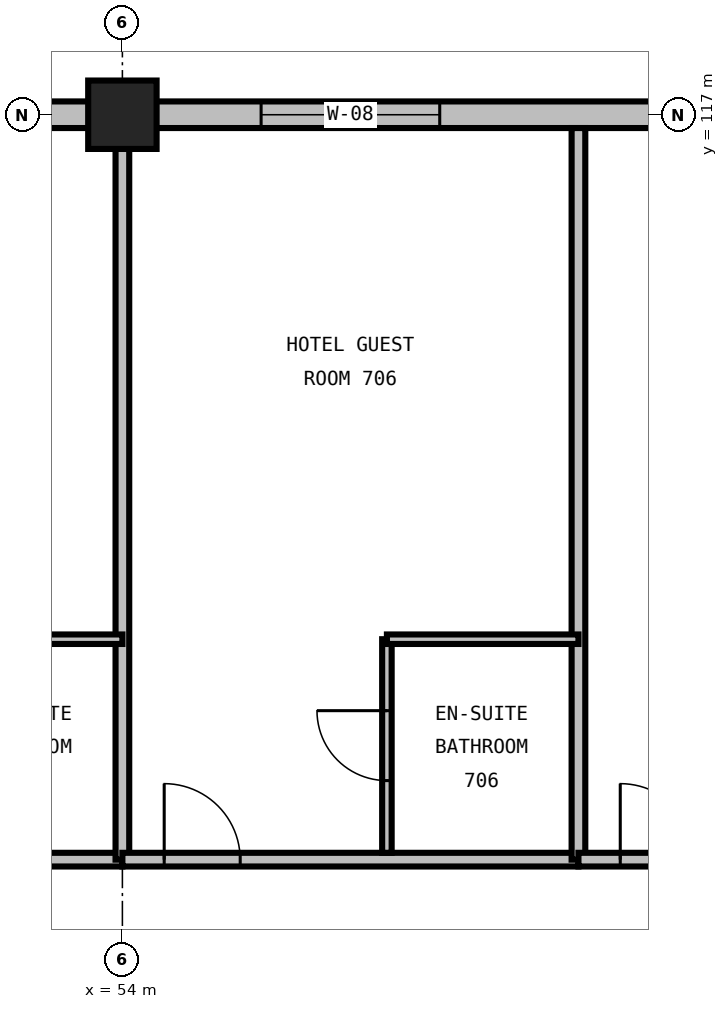
"""IFC4 building model, lengths in metres.
Left out: names, types, materials, properties, quantities, classifications, styles, units other than length and angle.
Written with IfcOpenShell. Run it as: python <this file> out.ifc"""

import sys

from ifc_helpers import new_model, si_unit, direction, frame, frame_2d, origin, origin_2d, place, context, subcontext, project, spatial, rectangle, extrude, element, fill, save


model = new_model("IFC4")
c1 = context("Model", 3, precision=1e-05, world=origin(), true_north=direction((0.0, 1.0)))
c2 = subcontext(c1, "Body", "Model", "MODEL_VIEW")
j1 = project(units=[si_unit("LENGTHUNIT", "METRE"), si_unit("PLANEANGLEUNIT", "RADIAN")], contexts=[c1])
p1 = place(None, origin())
s1 = spatial("IfcSite", under=j1, at=p1, CompositionType="ELEMENT")
p2 = place(p1, origin())
s2 = spatial("IfcBuilding", under=s1, at=p2, CompositionType="ELEMENT")
p3 = place(p2, frame((0.0, 0.0, 34.8)))
s3 = spatial("IfcBuildingStorey", under=s2, at=p3, CompositionType="ELEMENT", Elevation=34.8)
p4 = place(p3, frame((54.0, 117.0, 0.0), z_axis=(0.0, 0.0, 1.0), x_axis=(1.0, 0.0, 0.0)))
e1 = element("IfcColumn", 1, at=p4, inside=s3, PredefinedType="COLUMN", context=c2, shape_type="SweptSolid", body=[
    extrude(rectangle(XDim=0.9, YDim=0.9, at=origin_2d()), origin(), (0.0, 0.0, 1.0), 3.6),
])
p5 = place(p3, frame((54.0, 117.0, 0.0), z_axis=(0.0, 0.0, 1.0), x_axis=(-1.0, 0.0, 0.0)))
e2 = element("IfcWall", 2, at=p5, inside=s3, PredefinedType="STANDARD", context=c2, shape_type="SweptSolid", body=[
    extrude(rectangle(XDim=12.0, YDim=0.35, at=frame_2d((6.0, 0.0))), origin(), (0.0, 0.0, 1.0), 2.486),
])
p6 = place(p5, frame((1.9, 0.0, 0.75)))
e3 = element("IfcOpeningElement", 3, at=p6, cuts=e2, PredefinedType="OPENING", context=c2, shape_type="SweptSolid", body=[
    extrude(rectangle(XDim=2.2, YDim=1.6, at=frame_2d((1.1, 0.8))), frame((0.0, 0.19, 0.0), z_axis=(0.0, -1.0, 0.0), x_axis=(1.0, 0.0, 0.0)), (0.0, 0.0, 1.0), 0.38),
])
p7 = place(p5, frame((7.825, 0.0, 0.75)))
e4 = element("IfcOpeningElement", 4, at=p7, cuts=e2, PredefinedType="OPENING", context=c2, shape_type="SweptSolid", body=[
    extrude(rectangle(XDim=2.35, YDim=1.6, at=frame_2d((1.175, 0.8))), frame((0.0, 0.19, 0.0), z_axis=(0.0, -1.0, 0.0), x_axis=(1.0, 0.0, 0.0)), (0.0, 0.0, 1.0), 0.38),
])
p8 = place(p3, frame((66.0, 117.0, 0.0), z_axis=(0.0, 0.0, 1.0), x_axis=(-1.0, 0.0, 0.0)))
e5 = element("IfcWall", 5, at=p8, inside=s3, PredefinedType="STANDARD", context=c2, shape_type="SweptSolid", body=[
    extrude(rectangle(XDim=12.0, YDim=0.35, at=frame_2d((6.0, 0.0))), origin(), (0.0, 0.0, 1.0), 2.486),
])
p9 = place(p8, frame((1.9, 0.0, 0.75)))
e6 = element("IfcOpeningElement", 6, at=p9, cuts=e5, PredefinedType="OPENING", context=c2, shape_type="SweptSolid", body=[
    extrude(rectangle(XDim=2.2, YDim=1.6, at=frame_2d((1.1, 0.8))), frame((0.0, 0.19, 0.0), z_axis=(0.0, -1.0, 0.0), x_axis=(1.0, 0.0, 0.0)), (0.0, 0.0, 1.0), 0.38),
])
p10 = place(p8, frame((7.825, 0.0, 0.75)))
e7 = element("IfcOpeningElement", 7, at=p10, cuts=e5, PredefinedType="OPENING", context=c2, shape_type="SweptSolid", body=[
    extrude(rectangle(XDim=2.35, YDim=1.6, at=frame_2d((1.175, 0.8))), frame((0.0, 0.19, 0.0), z_axis=(0.0, -1.0, 0.0), x_axis=(1.0, 0.0, 0.0)), (0.0, 0.0, 1.0), 0.38),
])
p11 = place(p3, frame((48.0, 107.2, 0.0), z_axis=(0.0, 0.0, 1.0), x_axis=(1.0, 0.0, 0.0)))
e8 = element("IfcWall", 8, at=p11, inside=s3, PredefinedType="PARTITIONING", context=c2, shape_type="SweptSolid", body=[
    extrude(rectangle(XDim=6.0, YDim=0.18, at=frame_2d((3.0, 0.0))), origin(), (0.0, 0.0, 1.0), 3.29),
])
p12 = place(p11, frame((0.55, 0.0, 0.0)))
e9 = element("IfcOpeningElement", 9, at=p12, cuts=e8, PredefinedType="OPENING", context=c2, shape_type="SweptSolid", body=[
    extrude(rectangle(XDim=1.0, YDim=2.15, at=frame_2d((0.5, 1.075))), frame((0.0, 0.105, 0.0), z_axis=(0.0, -1.0, 0.0), x_axis=(1.0, 0.0, 0.0)), (0.0, 0.0, 1.0), 0.21),
])
p13 = place(p3, frame((54.0, 107.2, 0.0), z_axis=(0.0, 0.0, 1.0), x_axis=(0.0, 1.0, 0.0)))
e10 = element("IfcWall", 10, at=p13, inside=s3, PredefinedType="PARTITIONING", context=c2, shape_type="SweptSolid", body=[
    extrude(rectangle(XDim=9.625, YDim=0.18, at=frame_2d((4.812, 0.0))), origin(), (0.0, 0.0, 1.0), 2.59),
])
p14 = place(p3, frame((51.48, 110.1, 0.0), z_axis=(0.0, 0.0, 1.0), x_axis=(1.0, 0.0, 0.0)))
e11 = element("IfcWall", 11, at=p14, inside=s3, PredefinedType="PARTITIONING", context=c2, shape_type="SweptSolid", body=[
    extrude(rectangle(XDim=2.52, YDim=0.125, at=frame_2d((1.26, 0.0))), origin(), (0.0, 0.0, 1.0), 3.29),
])
p15 = place(p3, frame((54.0, 107.2, 0.0), z_axis=(0.0, 0.0, 1.0), x_axis=(1.0, 0.0, 0.0)))
e12 = element("IfcWall", 12, at=p15, inside=s3, PredefinedType="PARTITIONING", context=c2, shape_type="SweptSolid", body=[
    extrude(rectangle(XDim=6.0, YDim=0.18, at=frame_2d((3.0, 0.0))), origin(), (0.0, 0.0, 1.0), 3.29),
])
p16 = place(p15, frame((0.55, 0.0, 0.0)))
e13 = element("IfcOpeningElement", 13, at=p16, cuts=e12, PredefinedType="OPENING", context=c2, shape_type="SweptSolid", body=[
    extrude(rectangle(XDim=1.0, YDim=2.15, at=frame_2d((0.5, 1.075))), frame((0.0, 0.105, 0.0), z_axis=(0.0, -1.0, 0.0), x_axis=(1.0, 0.0, 0.0)), (0.0, 0.0, 1.0), 0.21),
])
p17 = place(p3, frame((60.0, 107.2, 0.0), z_axis=(0.0, 0.0, 1.0), x_axis=(0.0, 1.0, 0.0)))
e14 = element("IfcWall", 14, at=p17, inside=s3, PredefinedType="PARTITIONING", context=c2, shape_type="SweptSolid", body=[
    extrude(rectangle(XDim=9.625, YDim=0.18, at=frame_2d((4.812, 0.0))), origin(), (0.0, 0.0, 1.0), 3.29),
])
p18 = place(p3, frame((57.48, 107.29, 0.0), z_axis=(0.0, 0.0, 1.0), x_axis=(0.0, 1.0, 0.0)))
e15 = element("IfcWall", 15, at=p18, inside=s3, PredefinedType="PARTITIONING", context=c2, shape_type="SweptSolid", body=[
    extrude(rectangle(XDim=2.81, YDim=0.125, at=frame_2d((1.405, 0.0))), origin(), (0.0, 0.0, 1.0), 3.29),
])
p19 = place(p18, frame((0.95, 0.0, 0.0)))
e16 = element("IfcOpeningElement", 16, at=p19, cuts=e15, PredefinedType="OPENING", context=c2, shape_type="SweptSolid", body=[
    extrude(rectangle(XDim=0.92, YDim=2.1, at=frame_2d((0.46, 1.05))), frame((0.0, 0.077, 0.0), z_axis=(0.0, -1.0, 0.0), x_axis=(1.0, 0.0, 0.0)), (0.0, 0.0, 1.0), 0.155),
])
p20 = place(p3, frame((57.48, 110.1, 0.0), z_axis=(0.0, 0.0, 1.0), x_axis=(1.0, 0.0, 0.0)))
e17 = element("IfcWall", 17, at=p20, inside=s3, PredefinedType="PARTITIONING", context=c2, shape_type="SweptSolid", body=[
    extrude(rectangle(XDim=2.52, YDim=0.125, at=frame_2d((1.26, 0.0))), origin(), (0.0, 0.0, 1.0), 3.29),
])
p21 = place(p3, frame((60.0, 107.2, 0.0), z_axis=(0.0, 0.0, 1.0), x_axis=(1.0, 0.0, 0.0)))
e18 = element("IfcWall", 18, at=p21, inside=s3, PredefinedType="PARTITIONING", context=c2, shape_type="SweptSolid", body=[
    extrude(rectangle(XDim=6.0, YDim=0.18, at=frame_2d((3.0, 0.0))), origin(), (0.0, 0.0, 1.0), 3.29),
])
p22 = place(p21, frame((0.55, 0.0, 0.0)))
e19 = element("IfcOpeningElement", 19, at=p22, cuts=e18, PredefinedType="OPENING", context=c2, shape_type="SweptSolid", body=[
    extrude(rectangle(XDim=1.0, YDim=2.15, at=frame_2d((0.5, 1.075))), frame((0.0, 0.105, 0.0), z_axis=(0.0, -1.0, 0.0), x_axis=(1.0, 0.0, 0.0)), (0.0, 0.0, 1.0), 0.21),
])
p23 = place(p10, origin())
e20 = element("IfcWindow", 20, at=p23, inside=s3, PartitioningType="DOUBLE_PANEL_VERTICAL", PredefinedType="WINDOW", context=c2, shape_type="SweptSolid", body=[
    extrude(rectangle(XDim=2.35, YDim=1.6, at=frame_2d((1.175, 0.8))), frame((0.0, 0.03, 0.0), z_axis=(0.0, -1.0, 0.0), x_axis=(1.0, 0.0, 0.0)), (0.0, 0.0, 1.0), 0.06),
])
fill(e7, e20)
p24 = place(p16, origin())
e21 = element("IfcDoor", 21, at=p24, inside=s3, OperationType="SINGLE_SWING_LEFT", PredefinedType="DOOR", context=c2, shape_type="SweptSolid", body=[
    extrude(rectangle(XDim=1.0, YDim=2.15, at=frame_2d((0.5, 1.075))), frame((0.0, 0.025, 0.0), z_axis=(0.0, -1.0, 0.0), x_axis=(1.0, 0.0, 0.0)), (0.0, 0.0, 1.0), 0.05),
])
fill(e13, e21)
p25 = place(p19, origin())
e22 = element("IfcDoor", 22, at=p25, inside=s3, OperationType="SINGLE_SWING_RIGHT", PredefinedType="DOOR", context=c2, shape_type="SweptSolid", body=[
    extrude(rectangle(XDim=0.92, YDim=2.1, at=frame_2d((0.46, 1.05))), frame((0.0, 0.025, 0.0), z_axis=(0.0, -1.0, 0.0), x_axis=(1.0, 0.0, 0.0)), (0.0, 0.0, 1.0), 0.05),
])
fill(e16, e22)
p26 = place(p22, origin())
e23 = element("IfcDoor", 23, at=p26, inside=s3, OperationType="SINGLE_SWING_LEFT", PredefinedType="DOOR", context=c2, shape_type="SweptSolid", body=[
    extrude(rectangle(XDim=1.0, YDim=2.15, at=frame_2d((0.5, 1.075))), frame((0.0, 0.025, 0.0), z_axis=(0.0, -1.0, 0.0), x_axis=(1.0, 0.0, 0.0)), (0.0, 0.0, 1.0), 0.05),
])
fill(e19, e23)
save(model, sys.argv[1])
